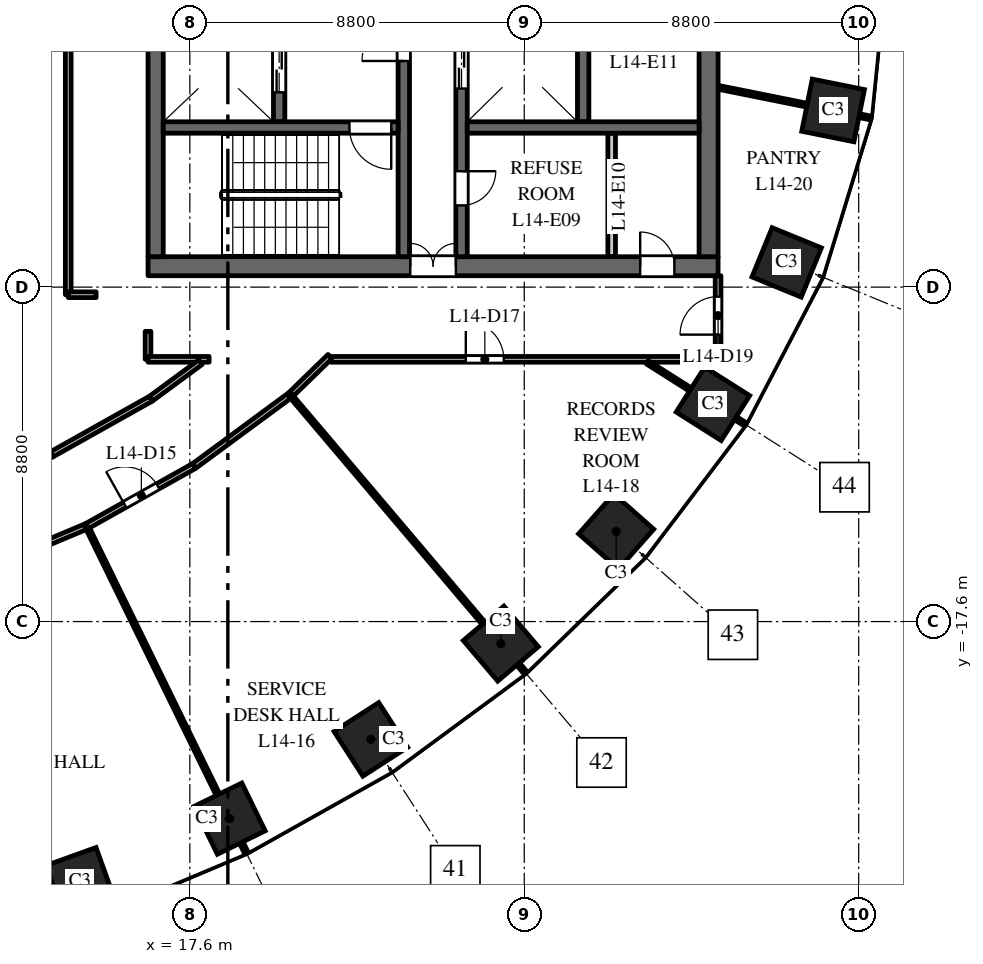
"""IFC4 building model, lengths in metres.
Left out: names, types, materials, properties, quantities, classifications, styles, units other than length and angle.
Written with IfcOpenShell. Run it as: python <this file> out.ifc"""

import sys

from ifc_helpers import new_model, si_unit, direction, frame, frame_2d, origin, origin_2d, place, context, subcontext, project, spatial, rectangle, extrude, element, fill, save


model = new_model("IFC4")
c1 = context("Model", 3, precision=1e-05, world=origin(), true_north=direction((0.0, 1.0)))
c2 = subcontext(c1, "Body", "Model", "MODEL_VIEW")
j1 = project(units=[si_unit("LENGTHUNIT", "METRE"), si_unit("PLANEANGLEUNIT", "RADIAN")], contexts=[c1])
p1 = place(None, origin())
s1 = spatial("IfcSite", under=j1, at=p1, CompositionType="ELEMENT")
p2 = place(p1, origin())
s2 = spatial("IfcBuilding", under=s1, at=p2, CompositionType="ELEMENT")
p3 = place(p2, frame((0.0, 0.0, 66.5)))
s3 = spatial("IfcBuildingStorey", under=s2, at=p3, CompositionType="ELEMENT", Elevation=66.5)
for number, where, z_axis, x_axis in (
    (1, (14.709, -24.441, 0.0), (0.0, 0.0, 1.0), (0.941, 0.338, 0.0)),
    (2, (18.646, -22.785, 0.0), (0.0, 0.0, 1.0), (0.898, 0.439, 0.0)),
    (3, (22.362, -20.7, 0.0), (0.0, 0.0, 1.0), (0.84, 0.542, 0.0)),
    (4, (25.783, -18.18, 0.0), (0.0, 0.0, 1.0), (0.763, 0.646, 0.0)),
    (5, (28.819, -15.23, 0.0), (0.0, 0.0, 1.0), (0.663, 0.749, 0.0)),
    (6, (31.365, -11.871, 0.0), (0.0, 0.0, 1.0), (0.535, 0.845, 0.0)),
    (7, (33.305, -8.149, 0.0), (0.0, 0.0, 1.0), (0.379, 0.925, 0.0)),
    (8, (34.527, -4.151, 0.0), (0.0, 0.0, 1.0), (0.197, 0.98, 0.0)),
):
    element("IfcColumn", number, at=place(p3, frame(where, z_axis=z_axis, x_axis=x_axis)), inside=s3, PredefinedType="COLUMN", context=c2, shape_type="SweptSolid", body=[
        extrude(rectangle(XDim=1.4, YDim=1.4, at=origin_2d()), origin(), (0.0, 0.0, 1.0), 4.0),
    ])
p4 = place(p3, frame((16.5, -8.25, 0.0), z_axis=(0.0, 0.0, 1.0), x_axis=(1.0, 0.0, 0.0)))
e9 = element("IfcWall", 9, at=p4, inside=s3, PredefinedType="SHEAR", context=c2, shape_type="SweptSolid", body=[
    extrude(rectangle(XDim=15.0, YDim=0.5, at=frame_2d((7.5, 0.0))), origin(), (0.0, 0.0, 1.0), 3.7),
])
p5 = place(p4, frame((6.9, 0.0, 0.0)))
e10 = element("IfcOpeningElement", 10, at=p5, cuts=e9, PredefinedType="OPENING", context=c2, shape_type="SweptSolid", body=[
    extrude(rectangle(XDim=1.2, YDim=2.1, at=frame_2d((0.6, 1.05))), frame((0.0, 0.26, 0.0), z_axis=(0.0, -1.0, 0.0), x_axis=(1.0, 0.0, 0.0)), (0.0, 0.0, 1.0), 0.52),
])
p6 = place(p4, frame((12.95, 0.0, 0.0)))
e11 = element("IfcOpeningElement", 11, at=p6, cuts=e9, PredefinedType="OPENING", context=c2, shape_type="SweptSolid", body=[
    extrude(rectangle(XDim=0.9, YDim=2.1, at=frame_2d((0.45, 1.05))), frame((0.0, 0.26, 0.0), z_axis=(0.0, -1.0, 0.0), x_axis=(1.0, 0.0, 0.0)), (0.0, 0.0, 1.0), 0.52),
])
p7 = place(p3, frame((27.95, -4.45, 0.0), z_axis=(0.0, 0.0, 1.0), x_axis=(0.0, 1.0, 0.0)))
e12 = element("IfcWall", 12, at=p7, inside=s3, PredefinedType="SHEAR", context=c2, shape_type="SweptSolid", body=[
    extrude(rectangle(XDim=8.9, YDim=0.3, at=frame_2d((4.45, 0.0))), origin(), (0.0, 0.0, 1.0), 3.7),
])
p8 = place(p3, frame((19.95, -4.45, 0.0), z_axis=(0.0, 0.0, 1.0), x_axis=(0.0, 1.0, 0.0)))
e13 = element("IfcWall", 13, at=p8, inside=s3, PredefinedType="SHEAR", context=c2, shape_type="SweptSolid", body=[
    extrude(rectangle(XDim=8.9, YDim=0.3, at=frame_2d((4.45, 0.0))), origin(), (0.0, 0.0, 1.0), 3.7),
])
p9 = place(p8, frame((0.775, 0.0, 0.0)))
e14 = element("IfcOpeningElement", 14, at=p9, cuts=e13, PredefinedType="OPENING", context=c2, shape_type="SweptSolid", body=[
    extrude(rectangle(XDim=1.2, YDim=2.1, at=frame_2d((0.6, 1.05))), frame((0.0, 0.16, 0.0), z_axis=(0.0, -1.0, 0.0), x_axis=(1.0, 0.0, 0.0)), (0.0, 0.0, 1.0), 0.32),
])
p10 = place(p8, frame((4.62, 0.0, 0.0)))
e15 = element("IfcOpeningElement", 15, at=p10, cuts=e13, PredefinedType="OPENING", context=c2, shape_type="SweptSolid", body=[
    extrude(rectangle(XDim=0.9, YDim=2.1, at=frame_2d((0.45, 1.05))), frame((0.0, 0.16, 0.0), z_axis=(0.0, -1.0, 0.0), x_axis=(1.0, 0.0, 0.0)), (0.0, 0.0, 1.0), 0.32),
])
p11 = place(p8, frame((6.975, 0.0, 0.0)))
e16 = element("IfcOpeningElement", 16, at=p11, cuts=e13, PredefinedType="OPENING", context=c2, shape_type="SweptSolid", body=[
    extrude(rectangle(XDim=0.9, YDim=2.1, at=frame_2d((0.45, 1.05))), frame((0.0, 0.16, 0.0), z_axis=(0.0, -1.0, 0.0), x_axis=(1.0, 0.0, 0.0)), (0.0, 0.0, 1.0), 0.32),
])
p12 = place(p3, frame((24.75, -8.0, 0.0), z_axis=(0.0, 0.0, 1.0), x_axis=(0.0, 1.0, 0.0)))
e17 = element("IfcWall", 17, at=p12, inside=s3, PredefinedType="SHEAR", context=c2, shape_type="SweptSolid", body=[
    extrude(rectangle(XDim=16.0, YDim=0.3, at=frame_2d((8.0, 0.0))), origin(), (0.0, 0.0, 1.0), 3.7),
])
p13 = place(p12, frame((4.425, 0.0, 0.0)))
e18 = element("IfcOpeningElement", 18, at=p13, cuts=e17, PredefinedType="OPENING", context=c2, shape_type="SweptSolid", body=[
    extrude(rectangle(XDim=1.1, YDim=2.1, at=frame_2d((0.55, 1.05))), frame((0.0, 0.16, 0.0), z_axis=(0.0, -1.0, 0.0), x_axis=(1.0, 0.0, 0.0)), (0.0, 0.0, 1.0), 0.32),
])
p14 = place(p12, frame((7.45, 0.0, 0.0)))
e19 = element("IfcOpeningElement", 19, at=p14, cuts=e17, PredefinedType="OPENING", context=c2, shape_type="SweptSolid", body=[
    extrude(rectangle(XDim=1.1, YDim=2.1, at=frame_2d((0.55, 1.05))), frame((0.0, 0.16, 0.0), z_axis=(0.0, -1.0, 0.0), x_axis=(1.0, 0.0, 0.0)), (0.0, 0.0, 1.0), 0.32),
])
p15 = place(p12, frame((10.425, 0.0, 0.0)))
e20 = element("IfcOpeningElement", 20, at=p15, cuts=e17, PredefinedType="OPENING", context=c2, shape_type="SweptSolid", body=[
    extrude(rectangle(XDim=1.2, YDim=2.1, at=frame_2d((0.6, 1.05))), frame((0.0, 0.16, 0.0), z_axis=(0.0, -1.0, 0.0), x_axis=(1.0, 0.0, 0.0)), (0.0, 0.0, 1.0), 0.32),
])
p16 = place(p12, frame((13.125, 0.0, 0.0)))
e21 = element("IfcOpeningElement", 21, at=p16, cuts=e17, PredefinedType="OPENING", context=c2, shape_type="SweptSolid", body=[
    extrude(rectangle(XDim=0.9, YDim=2.1, at=frame_2d((0.45, 1.05))), frame((0.0, 0.16, 0.0), z_axis=(0.0, -1.0, 0.0), x_axis=(1.0, 0.0, 0.0)), (0.0, 0.0, 1.0), 0.32),
])
p17 = place(p12, frame((14.75, 0.0, 0.0)))
e22 = element("IfcOpeningElement", 22, at=p17, cuts=e17, PredefinedType="OPENING", context=c2, shape_type="SweptSolid", body=[
    extrude(rectangle(XDim=0.9, YDim=2.1, at=frame_2d((0.45, 1.05))), frame((0.0, 0.16, 0.0), z_axis=(0.0, -1.0, 0.0), x_axis=(1.0, 0.0, 0.0)), (0.0, 0.0, 1.0), 0.32),
])
p18 = place(p12, frame((1.35, 0.0, 0.0)))
e23 = element("IfcOpeningElement", 23, at=p18, cuts=e17, PredefinedType="OPENING", context=c2, shape_type="SweptSolid", body=[
    extrude(rectangle(XDim=0.9, YDim=2.1, at=frame_2d((0.45, 1.05))), frame((0.0, 0.16, 0.0), z_axis=(0.0, -1.0, 0.0), x_axis=(1.0, 0.0, 0.0)), (0.0, 0.0, 1.0), 0.32),
])
p19 = place(p3, frame((16.7, -8.0, 0.0), z_axis=(0.0, 0.0, 1.0), x_axis=(0.0, 1.0, 0.0)))
e24 = element("IfcWall", 24, at=p19, inside=s3, PredefinedType="SHEAR", context=c2, shape_type="SweptSolid", body=[
    extrude(rectangle(XDim=16.0, YDim=0.4, at=frame_2d((8.0, 0.0))), origin(), (0.0, 0.0, 1.0), 3.7),
])
p20 = place(p3, frame((31.25, -8.0, 0.0), z_axis=(0.0, 0.0, 1.0), x_axis=(0.0, 1.0, 0.0)))
e25 = element("IfcWall", 25, at=p20, inside=s3, PredefinedType="SHEAR", context=c2, shape_type="SweptSolid", body=[
    extrude(rectangle(XDim=16.0, YDim=0.5, at=frame_2d((8.0, 0.0))), origin(), (0.0, 0.0, 1.0), 3.7),
])
p21 = place(p3, frame((28.7, -8.0, 0.0), z_axis=(0.0, 0.0, 1.0), x_axis=(0.0, 1.0, 0.0)))
e26 = element("IfcWall", 26, at=p21, inside=s3, PredefinedType="PARTITIONING", context=c2, shape_type="SweptSolid", body=[
    extrude(rectangle(XDim=3.25, YDim=0.2, at=frame_2d((1.625, 0.0))), origin(), (0.0, 0.0, 1.0), 3.7),
])
p22 = place(p3, frame((24.9, -4.6, 0.0), z_axis=(0.0, 0.0, 1.0), x_axis=(1.0, 0.0, 0.0)))
e27 = element("IfcWall", 27, at=p22, inside=s3, PredefinedType="SHEAR", context=c2, shape_type="SweptSolid", body=[
    extrude(rectangle(XDim=6.1, YDim=0.3, at=frame_2d((3.05, 0.0))), origin(), (0.0, 0.0, 1.0), 3.7),
])
p23 = place(p3, frame((23.23, -8.0, 0.0), z_axis=(0.0, 0.0, 1.0), x_axis=(0.0, 1.0, 0.0)))
e28 = element("IfcWall", 28, at=p23, inside=s3, PredefinedType="SHEAR", context=c2, shape_type="SweptSolid", body=[
    extrude(rectangle(XDim=7.875, YDim=0.3, at=frame_2d((3.938, 0.0))), origin(), (0.0, 0.0, 1.0), 3.7),
])
p24 = place(p23, frame((5.15, 0.0, 0.0)))
e29 = element("IfcOpeningElement", 29, at=p24, cuts=e28, PredefinedType="OPENING", context=c2, shape_type="SweptSolid", body=[
    extrude(rectangle(XDim=1.1, YDim=2.1, at=frame_2d((0.55, 1.05))), frame((0.0, 0.16, 0.0), z_axis=(0.0, -1.0, 0.0), x_axis=(1.0, 0.0, 0.0)), (0.0, 0.0, 1.0), 0.32),
])
p25 = place(p3, frame((16.9, -4.6, 0.0), z_axis=(0.0, 0.0, 1.0), x_axis=(1.0, 0.0, 0.0)))
e30 = element("IfcWall", 30, at=p25, inside=s3, PredefinedType="SHEAR", context=c2, shape_type="SweptSolid", body=[
    extrude(rectangle(XDim=6.18, YDim=0.3, at=frame_2d((3.09, 0.0))), origin(), (0.0, 0.0, 1.0), 3.7),
])
p26 = place(p25, frame((4.9, 0.0, 0.0)))
e31 = element("IfcOpeningElement", 31, at=p26, cuts=e30, PredefinedType="OPENING", context=c2, shape_type="SweptSolid", body=[
    extrude(rectangle(XDim=1.1, YDim=2.1, at=frame_2d((0.55, 1.05))), frame((0.0, 0.16, 0.0), z_axis=(0.0, -1.0, 0.0), x_axis=(1.0, 0.0, 0.0)), (0.0, 0.0, 1.0), 0.32),
])
p27 = place(p3, frame((11.101, -14.405, 0.0), z_axis=(0.0, 0.0, 1.0), x_axis=(0.921753827375, 0.387775555857, 0.0)))
e32 = element("IfcWall", 32, at=p27, inside=s3, PredefinedType="PARTITIONING", context=c2, shape_type="SweptSolid", body=[
    extrude(rectangle(XDim=3.103, YDim=0.15, at=frame_2d((1.551, 0.0))), origin(), (0.0, 0.0, 1.0), 3.7),
])
p28 = place(p3, frame((11.812, -16.384, 0.0), z_axis=(0.0, 0.0, 1.0), x_axis=(0.921839278558, 0.387572373252, 0.0)))
e33 = element("IfcWall", 33, at=p28, inside=s3, PredefinedType="PARTITIONING", context=c2, shape_type="SweptSolid", body=[
    extrude(rectangle(XDim=3.333, YDim=0.15, at=frame_2d((1.667, 0.0))), origin(), (0.0, 0.0, 1.0), 3.7),
])
p29 = place(p3, frame((13.961, -13.202, 0.0), z_axis=(0.0, 0.0, 1.0), x_axis=(0.872164226045, 0.489213207924, 0.0)))
e34 = element("IfcWall", 34, at=p29, inside=s3, PredefinedType="PARTITIONING", context=c2, shape_type="SweptSolid", body=[
    extrude(rectangle(XDim=2.998, YDim=0.15, at=frame_2d((1.499, 0.0))), origin(), (0.0, 0.0, 1.0), 3.7),
])
p30 = place(p3, frame((14.4, -9.0, 0.0), z_axis=(0.0, 0.0, 1.0), x_axis=(0.0, 1.0, 0.0)))
e35 = element("IfcWall", 35, at=p30, inside=s3, PredefinedType="PARTITIONING", context=c2, shape_type="SweptSolid", body=[
    extrude(rectangle(XDim=18.0, YDim=0.15, at=frame_2d((9.0, 0.0))), origin(), (0.0, 0.0, 1.0), 2.75),
])
p31 = place(p30, frame((8.6, 0.0, 0.0)))
e36 = element("IfcOpeningElement", 36, at=p31, cuts=e35, PredefinedType="OPENING", context=c2, shape_type="SweptSolid", body=[
    extrude(rectangle(XDim=1.0, YDim=2.1, at=frame_2d((0.5, 1.05))), frame((0.0, 0.085, 0.0), z_axis=(0.0, -1.0, 0.0), x_axis=(1.0, 0.0, 0.0)), (0.0, 0.0, 1.0), 0.17),
])
p32 = place(p3, frame((14.4, -9.0, 0.0), z_axis=(0.0, 0.0, 1.0), x_axis=(1.0, 0.0, 0.0)))
e37 = element("IfcWall", 37, at=p32, inside=s3, PredefinedType="PARTITIONING", context=c2, shape_type="SweptSolid", body=[
    extrude(rectangle(XDim=0.734, YDim=0.15, at=frame_2d((0.367, 0.0))), origin(), (0.0, 0.0, 1.0), 3.7),
])
p33 = place(p3, frame((14.887, -15.096, 0.0), z_axis=(0.0, 0.0, 1.0), x_axis=(0.439197765869, -0.89839040648, 0.0)))
e38 = element("IfcWall", 38, at=p33, inside=s3, PredefinedType="PARTITIONING", context=c2, shape_type="SweptSolid", body=[
    extrude(rectangle(XDim=9.561, YDim=0.1, at=frame_2d((4.78, 0.0))), origin(), (0.0, 0.0, 1.0), 2.85),
])
p34 = place(p3, frame((14.902, -15.082, 0.0), z_axis=(0.0, 0.0, 1.0), x_axis=(0.872144615544, 0.489248167679, 0.0)))
e39 = element("IfcWall", 39, at=p34, inside=s3, PredefinedType="PARTITIONING", context=c2, shape_type="SweptSolid", body=[
    extrude(rectangle(XDim=3.228, YDim=0.15, at=frame_2d((1.614, 0.0))), origin(), (0.0, 0.0, 1.0), 3.7),
])
p35 = place(p34, frame((1.13, 0.0, 0.0)))
e40 = element("IfcOpeningElement", 40, at=p35, cuts=e39, PredefinedType="OPENING", context=c2, shape_type="SweptSolid", body=[
    extrude(rectangle(XDim=1.0, YDim=2.1, at=frame_2d((0.5, 1.05))), frame((0.0, 0.085, 0.0), z_axis=(0.0, -1.0, 0.0), x_axis=(1.0, 0.0, 0.0)), (0.0, 0.0, 1.0), 0.17),
])
p36 = place(p3, frame((16.5, -10.7, 0.0), z_axis=(0.0, 0.0, 1.0), x_axis=(0.0, 1.0, 0.0)))
e41 = element("IfcWall", 41, at=p36, inside=s3, PredefinedType="PARTITIONING", context=c2, shape_type="SweptSolid", body=[
    extrude(rectangle(XDim=0.736, YDim=0.15, at=frame_2d((0.368, 0.0))), origin(), (0.0, 0.0, 1.0), 3.7),
])
p37 = place(p3, frame((16.5, -10.7, 0.0), z_axis=(0.0, 0.0, 1.0), x_axis=(1.0, 0.0, 0.0)))
e42 = element("IfcWall", 42, at=p37, inside=s3, PredefinedType="PARTITIONING", context=c2, shape_type="SweptSolid", body=[
    extrude(rectangle(XDim=1.607, YDim=0.15, at=frame_2d((0.803, 0.0))), origin(), (0.0, 0.0, 1.0), 3.7),
])
p38 = place(p3, frame((16.576, -11.735, 0.0), z_axis=(0.0, 0.0, 1.0), x_axis=(0.805021714708, 0.593245344566, 0.0)))
e43 = element("IfcWall", 43, at=p38, inside=s3, PredefinedType="PARTITIONING", context=c2, shape_type="SweptSolid", body=[
    extrude(rectangle(XDim=1.619, YDim=0.15, at=frame_2d((0.809, 0.0))), origin(), (0.0, 0.0, 1.0), 3.7),
])
p39 = place(p3, frame((17.717, -13.503, 0.0), z_axis=(0.0, 0.0, 1.0), x_axis=(0.805106688633, 0.593130019404, 0.0)))
e44 = element("IfcWall", 44, at=p39, inside=s3, PredefinedType="PARTITIONING", context=c2, shape_type="SweptSolid", body=[
    extrude(rectangle(XDim=3.137, YDim=0.15, at=frame_2d((1.569, 0.0))), origin(), (0.0, 0.0, 1.0), 3.7),
])
p40 = place(p3, frame((20.245, -11.645, 0.0), z_axis=(0.0, 0.0, 1.0), x_axis=(0.646420249139, -0.762981560395, 0.0)))
e45 = element("IfcWall", 45, at=p40, inside=s3, PredefinedType="PARTITIONING", context=c2, shape_type="SweptSolid", body=[
    extrude(rectangle(XDim=9.568, YDim=0.1, at=frame_2d((4.784, 0.0))), origin(), (0.0, 0.0, 1.0), 2.85),
])
p41 = place(p3, frame((20.257, -11.628, 0.0), z_axis=(0.0, 0.0, 1.0), x_axis=(0.717129161976, 0.696940288005, 0.0)))
e46 = element("IfcWall", 46, at=p41, inside=s3, PredefinedType="PARTITIONING", context=c2, shape_type="SweptSolid", body=[
    extrude(rectangle(XDim=1.439, YDim=0.15, at=frame_2d((0.719, 0.0))), origin(), (0.0, 0.0, 1.0), 2.75),
])
p42 = place(p3, frame((21.32, -10.7, 0.0), z_axis=(0.0, 0.0, 1.0), x_axis=(1.0, 0.0, 0.0)))
e47 = element("IfcWall", 47, at=p42, inside=s3, PredefinedType="PARTITIONING", context=c2, shape_type="SweptSolid", body=[
    extrude(rectangle(XDim=10.18, YDim=0.15, at=frame_2d((5.09, 0.0))), origin(), (0.0, 0.0, 1.0), 2.85),
])
p43 = place(p42, frame((3.542, 0.0, 0.0)))
e48 = element("IfcOpeningElement", 48, at=p43, cuts=e47, PredefinedType="OPENING", context=c2, shape_type="SweptSolid", body=[
    extrude(rectangle(XDim=1.0, YDim=2.1, at=frame_2d((0.5, 1.05))), frame((0.0, 0.085, 0.0), z_axis=(0.0, -1.0, 0.0), x_axis=(1.0, 0.0, 0.0)), (0.0, 0.0, 1.0), 0.17),
])
p44 = place(p3, frame((29.637, -10.777, 0.0), z_axis=(0.0, 0.0, 1.0), x_axis=(0.844810627195, -0.535065420467, 0.0)))
e49 = element("IfcWall", 49, at=p44, inside=s3, PredefinedType="PARTITIONING", context=c2, shape_type="SweptSolid", body=[
    extrude(rectangle(XDim=3.048, YDim=0.1, at=frame_2d((1.524, 0.0))), origin(), (0.0, 0.0, 1.0), 2.85),
])
p45 = place(p3, frame((31.5, -10.7, 0.0), z_axis=(0.0, 0.0, 1.0), x_axis=(0.0, 1.0, 0.0)))
e50 = element("IfcWall", 50, at=p45, inside=s3, PredefinedType="PARTITIONING", context=c2, shape_type="SweptSolid", body=[
    extrude(rectangle(XDim=2.2, YDim=0.15, at=frame_2d((1.1, 0.0))), origin(), (0.0, 0.0, 1.0), 2.85),
])
p46 = place(p45, frame((0.65, 0.0, 0.0)))
e51 = element("IfcOpeningElement", 51, at=p46, cuts=e50, PredefinedType="OPENING", context=c2, shape_type="SweptSolid", body=[
    extrude(rectangle(XDim=1.0, YDim=2.1, at=frame_2d((0.5, 1.05))), frame((0.0, 0.085, 0.0), z_axis=(0.0, -1.0, 0.0), x_axis=(1.0, 0.0, 0.0)), (0.0, 0.0, 1.0), 0.17),
])
p47 = place(p3, frame((31.5, -3.542, 0.0), z_axis=(0.0, 0.0, 1.0), x_axis=(0.980357474535, -0.197228857227, 0.0)))
e52 = element("IfcWall", 52, at=p47, inside=s3, PredefinedType="PARTITIONING", context=c2, shape_type="SweptSolid", body=[
    extrude(rectangle(XDim=4.092, YDim=0.1, at=frame_2d((2.046, 0.0))), origin(), (0.0, 0.0, 1.0), 2.85),
])
p48 = place(p9, origin())
e53 = element("IfcDoor", 53, at=p48, inside=s3, OperationType="DOUBLE_DOOR_SLIDING", PredefinedType="DOOR", context=c2, shape_type="SweptSolid", body=[
    extrude(rectangle(XDim=1.2, YDim=2.1, at=frame_2d((0.6, 1.05))), frame((0.0, 0.025, 0.0), z_axis=(0.0, -1.0, 0.0), x_axis=(1.0, 0.0, 0.0)), (0.0, 0.0, 1.0), 0.05),
])
fill(e14, e53)
p49 = place(p13, origin())
e54 = element("IfcDoor", 54, at=p49, inside=s3, OperationType="DOUBLE_DOOR_SLIDING", PredefinedType="DOOR", context=c2, shape_type="SweptSolid", body=[
    extrude(rectangle(XDim=1.1, YDim=2.1, at=frame_2d((0.55, 1.05))), frame((0.0, 0.025, 0.0), z_axis=(0.0, -1.0, 0.0), x_axis=(1.0, 0.0, 0.0)), (0.0, 0.0, 1.0), 0.05),
])
fill(e18, e54)
p50 = place(p26, origin())
e55 = element("IfcDoor", 55, at=p50, inside=s3, OperationType="SINGLE_SWING_RIGHT", PredefinedType="DOOR", context=c2, shape_type="SweptSolid", body=[
    extrude(rectangle(XDim=1.1, YDim=2.1, at=frame_2d((0.55, 1.05))), frame((0.0, 0.025, 0.0), z_axis=(0.0, -1.0, 0.0), x_axis=(1.0, 0.0, 0.0)), (0.0, 0.0, 1.0), 0.05),
])
fill(e31, e55)
p51 = place(p24, origin())
e56 = element("IfcDoor", 56, at=p51, inside=s3, OperationType="SINGLE_SWING_RIGHT", PredefinedType="DOOR", context=c2, shape_type="SweptSolid", body=[
    extrude(rectangle(XDim=1.1, YDim=2.1, at=frame_2d((0.55, 1.05))), frame((0.0, 0.025, 0.0), z_axis=(0.0, -1.0, 0.0), x_axis=(1.0, 0.0, 0.0)), (0.0, 0.0, 1.0), 0.05),
])
fill(e29, e56)
p52 = place(p5, origin())
e57 = element("IfcDoor", 57, at=p52, inside=s3, OperationType="DOUBLE_DOOR_DOUBLE_SWING", PredefinedType="DOOR", context=c2, shape_type="SweptSolid", body=[
    extrude(rectangle(XDim=1.2, YDim=2.1, at=frame_2d((0.6, 1.05))), frame((0.0, 0.025, 0.0), z_axis=(0.0, -1.0, 0.0), x_axis=(1.0, 0.0, 0.0)), (0.0, 0.0, 1.0), 0.05),
])
fill(e10, e57)
p53 = place(p18, origin())
e58 = element("IfcDoor", 58, at=p53, inside=s3, OperationType="SINGLE_SWING_RIGHT", PredefinedType="DOOR", context=c2, shape_type="SweptSolid", body=[
    extrude(rectangle(XDim=0.9, YDim=2.1, at=frame_2d((0.45, 1.05))), frame((0.0, 0.025, 0.0), z_axis=(0.0, -1.0, 0.0), x_axis=(1.0, 0.0, 0.0)), (0.0, 0.0, 1.0), 0.05),
])
fill(e23, e58)
p54 = place(p6, origin())
e59 = element("IfcDoor", 59, at=p54, inside=s3, OperationType="SINGLE_SWING_RIGHT", PredefinedType="DOOR", context=c2, shape_type="SweptSolid", body=[
    extrude(rectangle(XDim=0.9, YDim=2.1, at=frame_2d((0.45, 1.05))), frame((0.0, 0.025, 0.0), z_axis=(0.0, -1.0, 0.0), x_axis=(1.0, 0.0, 0.0)), (0.0, 0.0, 1.0), 0.05),
])
fill(e11, e59)
p55 = place(p35, origin())
e60 = element("IfcDoor", 60, at=p55, inside=s3, OperationType="SINGLE_SWING_LEFT", PredefinedType="DOOR", context=c2, shape_type="SweptSolid", body=[
    extrude(rectangle(XDim=1.0, YDim=2.1, at=frame_2d((0.5, 1.05))), frame((0.0, 0.025, 0.0), z_axis=(0.0, -1.0, 0.0), x_axis=(1.0, 0.0, 0.0)), (0.0, 0.0, 1.0), 0.05),
])
fill(e40, e60)
p56 = place(p43, origin())
e61 = element("IfcDoor", 61, at=p56, inside=s3, OperationType="SINGLE_SWING_LEFT", PredefinedType="DOOR", context=c2, shape_type="SweptSolid", body=[
    extrude(rectangle(XDim=1.0, YDim=2.1, at=frame_2d((0.5, 1.05))), frame((0.0, 0.025, 0.0), z_axis=(0.0, -1.0, 0.0), x_axis=(1.0, 0.0, 0.0)), (0.0, 0.0, 1.0), 0.05),
])
fill(e48, e61)
p57 = place(p46, origin())
e62 = element("IfcDoor", 62, at=p57, inside=s3, OperationType="SINGLE_SWING_LEFT", PredefinedType="DOOR", context=c2, shape_type="SweptSolid", body=[
    extrude(rectangle(XDim=1.0, YDim=2.1, at=frame_2d((0.5, 1.05))), frame((0.0, 0.025, 0.0), z_axis=(0.0, -1.0, 0.0), x_axis=(1.0, 0.0, 0.0)), (0.0, 0.0, 1.0), 0.05),
])
fill(e51, e62)
save(model, sys.argv[1])
